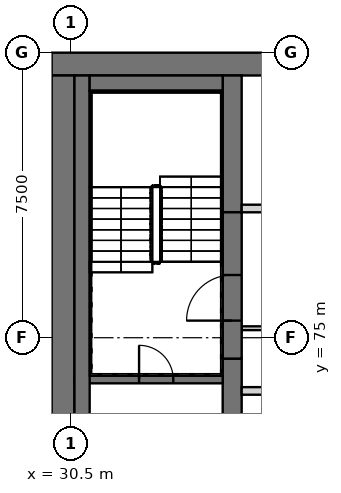
"""IFC4 building model, lengths in metres.
Left out: names, types, materials, properties, quantities, classifications, styles, units other than length and angle.
Written with IfcOpenShell. Run it as: python <this file> out.ifc"""

import sys

from ifc_helpers import new_model, si_unit, direction, frame, frame_2d, origin, place, context, subcontext, project, spatial, rectangle, extrude, element, fill, save


model = new_model("IFC4")
c1 = context("Model", 3, precision=1e-05, world=origin(), true_north=direction((0.0, 1.0)))
c2 = subcontext(c1, "Body", "Model", "MODEL_VIEW")
j1 = project(units=[si_unit("LENGTHUNIT", "METRE"), si_unit("PLANEANGLEUNIT", "RADIAN")], contexts=[c1])
p1 = place(None, origin())
s1 = spatial("IfcSite", under=j1, at=p1, CompositionType="ELEMENT")
p2 = place(p1, origin())
s2 = spatial("IfcBuilding", under=s1, at=p2, CompositionType="ELEMENT")
p3 = place(p2, frame((0.0, 0.0, 258.2)))
s3 = spatial("IfcBuildingStorey", under=s2, at=p3, CompositionType="ELEMENT", Elevation=258.2)
p4 = place(p3, frame((30.0, 82.2, 0.0), z_axis=(0.0, 0.0, 1.0), x_axis=(1.0, 0.0, 0.0)))
e1 = element("IfcWall", 1, at=p4, inside=s3, PredefinedType="SHEAR", context=c2, shape_type="SweptSolid", body=[
    extrude(rectangle(XDim=30.0, YDim=0.6, at=frame_2d((15.0, 0.0))), origin(), (0.0, 0.0, 1.0), 8.0),
])
p5 = place(p3, frame((30.3, 60.6, 0.0), z_axis=(0.0, 0.0, 1.0), x_axis=(0.0, 1.0, 0.0)))
e2 = element("IfcWall", 2, at=p5, inside=s3, PredefinedType="SHEAR", context=c2, shape_type="SweptSolid", body=[
    extrude(rectangle(XDim=21.3, YDim=0.6, at=frame_2d((10.65, 0.0))), origin(), (0.0, 0.0, 1.0), 8.0),
])
p6 = place(p3, frame((34.75, 68.05, 0.0), z_axis=(0.0, 0.0, 1.0), x_axis=(0.0, 1.0, 0.0)))
e3 = element("IfcWall", 3, at=p6, inside=s3, PredefinedType="SHEAR", context=c2, shape_type="SweptSolid", body=[
    extrude(rectangle(XDim=6.4, YDim=0.5, at=frame_2d((3.2, 0.0))), origin(), (0.0, 0.0, 1.0), 8.0),
])
p7 = place(p3, frame((34.75, 78.3, 0.0), z_axis=(0.0, 0.0, 1.0), x_axis=(0.0, 1.0, 0.0)))
e4 = element("IfcWall", 4, at=p7, inside=s3, PredefinedType="SHEAR", context=c2, shape_type="SweptSolid", body=[
    extrude(rectangle(XDim=3.6, YDim=0.5, at=frame_2d((1.8, 0.0))), origin(), (0.0, 0.0, 1.0), 8.0),
])
p8 = place(p3, frame((35.0, 73.6, 0.0), z_axis=(0.0, 0.0, 1.0), x_axis=(1.0, 0.0, 0.0)))
e5 = element("IfcWall", 5, at=p8, inside=s3, PredefinedType="SOLIDWALL", context=c2, shape_type="SweptSolid", body=[
    extrude(rectangle(XDim=15.6, YDim=0.2, at=frame_2d((7.8, 0.0))), origin(), (0.0, 0.0, 1.0), 8.0),
])
p9 = place(p8, frame((0.75, 0.0, 0.0)))
e6 = element("IfcOpeningElement", 6, at=p9, cuts=e5, PredefinedType="OPENING", context=c2, shape_type="SweptSolid", body=[
    extrude(rectangle(XDim=1.1, YDim=2.1, at=frame_2d((0.55, 1.05))), frame((0.0, 0.11, 0.0), z_axis=(0.0, -1.0, 0.0), x_axis=(1.0, 0.0, 0.0)), (0.0, 0.0, 1.0), 0.22),
])
p10 = place(p8, frame((3.35, 0.0, 0.0)))
e7 = element("IfcOpeningElement", 7, at=p10, cuts=e5, PredefinedType="OPENING", context=c2, shape_type="SweptSolid", body=[
    extrude(rectangle(XDim=1.1, YDim=2.1, at=frame_2d((0.55, 1.05))), frame((0.0, 0.11, 0.0), z_axis=(0.0, -1.0, 0.0), x_axis=(1.0, 0.0, 0.0)), (0.0, 0.0, 1.0), 0.22),
])
p11 = place(p8, frame((5.95, 0.0, 0.0)))
e8 = element("IfcOpeningElement", 8, at=p11, cuts=e5, PredefinedType="OPENING", context=c2, shape_type="SweptSolid", body=[
    extrude(rectangle(XDim=1.1, YDim=2.1, at=frame_2d((0.55, 1.05))), frame((0.0, 0.11, 0.0), z_axis=(0.0, -1.0, 0.0), x_axis=(1.0, 0.0, 0.0)), (0.0, 0.0, 1.0), 0.22),
])
p12 = place(p8, frame((8.55, 0.0, 0.0)))
e9 = element("IfcOpeningElement", 9, at=p12, cuts=e5, PredefinedType="OPENING", context=c2, shape_type="SweptSolid", body=[
    extrude(rectangle(XDim=1.1, YDim=2.1, at=frame_2d((0.55, 1.05))), frame((0.0, 0.11, 0.0), z_axis=(0.0, -1.0, 0.0), x_axis=(1.0, 0.0, 0.0)), (0.0, 0.0, 1.0), 0.22),
])
p13 = place(p8, frame((11.15, 0.0, 0.0)))
e10 = element("IfcOpeningElement", 10, at=p13, cuts=e5, PredefinedType="OPENING", context=c2, shape_type="SweptSolid", body=[
    extrude(rectangle(XDim=1.1, YDim=2.1, at=frame_2d((0.55, 1.05))), frame((0.0, 0.11, 0.0), z_axis=(0.0, -1.0, 0.0), x_axis=(1.0, 0.0, 0.0)), (0.0, 0.0, 1.0), 0.22),
])
p14 = place(p8, frame((13.75, 0.0, 0.0)))
e11 = element("IfcOpeningElement", 11, at=p14, cuts=e5, PredefinedType="OPENING", context=c2, shape_type="SweptSolid", body=[
    extrude(rectangle(XDim=1.1, YDim=2.1, at=frame_2d((0.55, 1.05))), frame((0.0, 0.11, 0.0), z_axis=(0.0, -1.0, 0.0), x_axis=(1.0, 0.0, 0.0)), (0.0, 0.0, 1.0), 0.22),
])
p15 = place(p3, frame((35.0, 78.4, 0.0), z_axis=(0.0, 0.0, 1.0), x_axis=(1.0, 0.0, 0.0)))
e12 = element("IfcWall", 12, at=p15, inside=s3, PredefinedType="SOLIDWALL", context=c2, shape_type="SweptSolid", body=[
    extrude(rectangle(XDim=15.6, YDim=0.2, at=frame_2d((7.8, 0.0))), origin(), (0.0, 0.0, 1.0), 8.0),
])
p16 = place(p15, frame((0.75, 0.0, 0.0)))
e13 = element("IfcOpeningElement", 13, at=p16, cuts=e12, PredefinedType="OPENING", context=c2, shape_type="SweptSolid", body=[
    extrude(rectangle(XDim=1.1, YDim=2.1, at=frame_2d((0.55, 1.05))), frame((0.0, 0.11, 0.0), z_axis=(0.0, -1.0, 0.0), x_axis=(1.0, 0.0, 0.0)), (0.0, 0.0, 1.0), 0.22),
])
p17 = place(p15, frame((3.35, 0.0, 0.0)))
e14 = element("IfcOpeningElement", 14, at=p17, cuts=e12, PredefinedType="OPENING", context=c2, shape_type="SweptSolid", body=[
    extrude(rectangle(XDim=1.1, YDim=2.1, at=frame_2d((0.55, 1.05))), frame((0.0, 0.11, 0.0), z_axis=(0.0, -1.0, 0.0), x_axis=(1.0, 0.0, 0.0)), (0.0, 0.0, 1.0), 0.22),
])
p18 = place(p15, frame((11.15, 0.0, 0.0)))
e15 = element("IfcOpeningElement", 15, at=p18, cuts=e12, PredefinedType="OPENING", context=c2, shape_type="SweptSolid", body=[
    extrude(rectangle(XDim=1.1, YDim=2.1, at=frame_2d((0.55, 1.05))), frame((0.0, 0.11, 0.0), z_axis=(0.0, -1.0, 0.0), x_axis=(1.0, 0.0, 0.0)), (0.0, 0.0, 1.0), 0.22),
])
p19 = place(p15, frame((13.75, 0.0, 0.0)))
e16 = element("IfcOpeningElement", 16, at=p19, cuts=e12, PredefinedType="OPENING", context=c2, shape_type="SweptSolid", body=[
    extrude(rectangle(XDim=1.1, YDim=2.1, at=frame_2d((0.55, 1.05))), frame((0.0, 0.11, 0.0), z_axis=(0.0, -1.0, 0.0), x_axis=(1.0, 0.0, 0.0)), (0.0, 0.0, 1.0), 0.22),
])
p20 = place(p3, frame((35.0, 75.25, 0.0), z_axis=(0.0, 0.0, 1.0), x_axis=(1.0, 0.0, 0.0)))
e17 = element("IfcWall", 17, at=p20, inside=s3, PredefinedType="PARTITIONING", context=c2, shape_type="SweptSolid", body=[
    extrude(rectangle(XDim=5.25, YDim=0.1, at=frame_2d((2.625, 0.0))), origin(), (0.0, 0.0, 1.0), 7.75),
])
p21 = place(p3, frame((34.75, 74.45, 0.0), z_axis=(0.0, 0.0, 1.0), x_axis=(0.0, 1.0, 0.0)))
e18 = element("IfcWall", 18, at=p21, inside=s3, PredefinedType="SOLIDWALL", context=c2, shape_type="SweptSolid", body=[
    extrude(rectangle(XDim=3.85, YDim=0.5, at=frame_2d((1.925, 0.0))), origin(), (0.0, 0.0, 1.0), 6.8),
])
p22 = place(p21, frame((1.0, 0.0, 0.0)))
e19 = element("IfcOpeningElement", 19, at=p22, cuts=e18, PredefinedType="OPENING", context=c2, shape_type="SweptSolid", body=[
    extrude(rectangle(XDim=1.2, YDim=2.1, at=frame_2d((0.6, 1.05))), frame((0.0, 0.26, 0.0), z_axis=(0.0, -1.0, 0.0), x_axis=(1.0, 0.0, 0.0)), (0.0, 0.0, 1.0), 0.52),
])
p23 = place(p3, frame((30.6, 73.9, 0.0), z_axis=(0.0, 0.0, 1.0), x_axis=(1.0, 0.0, 0.0)))
e20 = element("IfcWall", 20, at=p23, inside=s3, PredefinedType="SOLIDWALL", context=c2, shape_type="SweptSolid", body=[
    extrude(rectangle(XDim=3.9, YDim=0.2, at=frame_2d((1.95, 0.0))), origin(), (0.0, 0.0, 1.0), 7.75),
])
p24 = place(p23, frame((1.7, 0.0, 0.0)))
e21 = element("IfcOpeningElement", 21, at=p24, cuts=e20, PredefinedType="OPENING", context=c2, shape_type="SweptSolid", body=[
    extrude(rectangle(XDim=0.9, YDim=2.1, at=frame_2d((0.45, 1.05))), frame((0.0, 0.11, 0.0), z_axis=(0.0, -1.0, 0.0), x_axis=(1.0, 0.0, 0.0)), (0.0, 0.0, 1.0), 0.22),
])
p25 = place(p3, frame((30.8, 60.6, 0.0), z_axis=(0.0, 0.0, 1.0), x_axis=(0.0, 1.0, 0.0)))
e22 = element("IfcWall", 22, at=p25, inside=s3, PredefinedType="SOLIDWALL", context=c2, shape_type="SweptSolid", body=[
    extrude(rectangle(XDim=21.3, YDim=0.4, at=frame_2d((10.65, 0.0))), origin(), (0.0, 0.0, 1.0), 7.75),
])
p26 = place(p3, frame((31.0, 81.7, 0.0), z_axis=(0.0, 0.0, 1.0), x_axis=(1.0, 0.0, 0.0)))
e23 = element("IfcWall", 23, at=p26, inside=s3, PredefinedType="SOLIDWALL", context=c2, shape_type="SweptSolid", body=[
    extrude(rectangle(XDim=3.5, YDim=0.4, at=frame_2d((1.75, 0.0))), origin(), (0.0, 0.0, 1.0), 7.75),
])
p27 = place(p22, origin())
e24 = element("IfcDoor", 24, at=p27, inside=s3, OperationType="SINGLE_SWING_RIGHT", PredefinedType="DOOR", context=c2, shape_type="SweptSolid", body=[
    extrude(rectangle(XDim=1.2, YDim=2.1, at=frame_2d((0.6, 1.05))), frame((0.0, 0.025, 0.0), z_axis=(0.0, -1.0, 0.0), x_axis=(1.0, 0.0, 0.0)), (0.0, 0.0, 1.0), 0.05),
])
fill(e19, e24)
p28 = place(p24, origin())
e25 = element("IfcDoor", 25, at=p28, inside=s3, OperationType="SINGLE_SWING_RIGHT", PredefinedType="DOOR", context=c2, shape_type="SweptSolid", body=[
    extrude(rectangle(XDim=0.9, YDim=2.1, at=frame_2d((0.45, 1.05))), frame((0.0, 0.025, 0.0), z_axis=(0.0, -1.0, 0.0), x_axis=(1.0, 0.0, 0.0)), (0.0, 0.0, 1.0), 0.05),
])
fill(e21, e25)
save(model, sys.argv[1])
